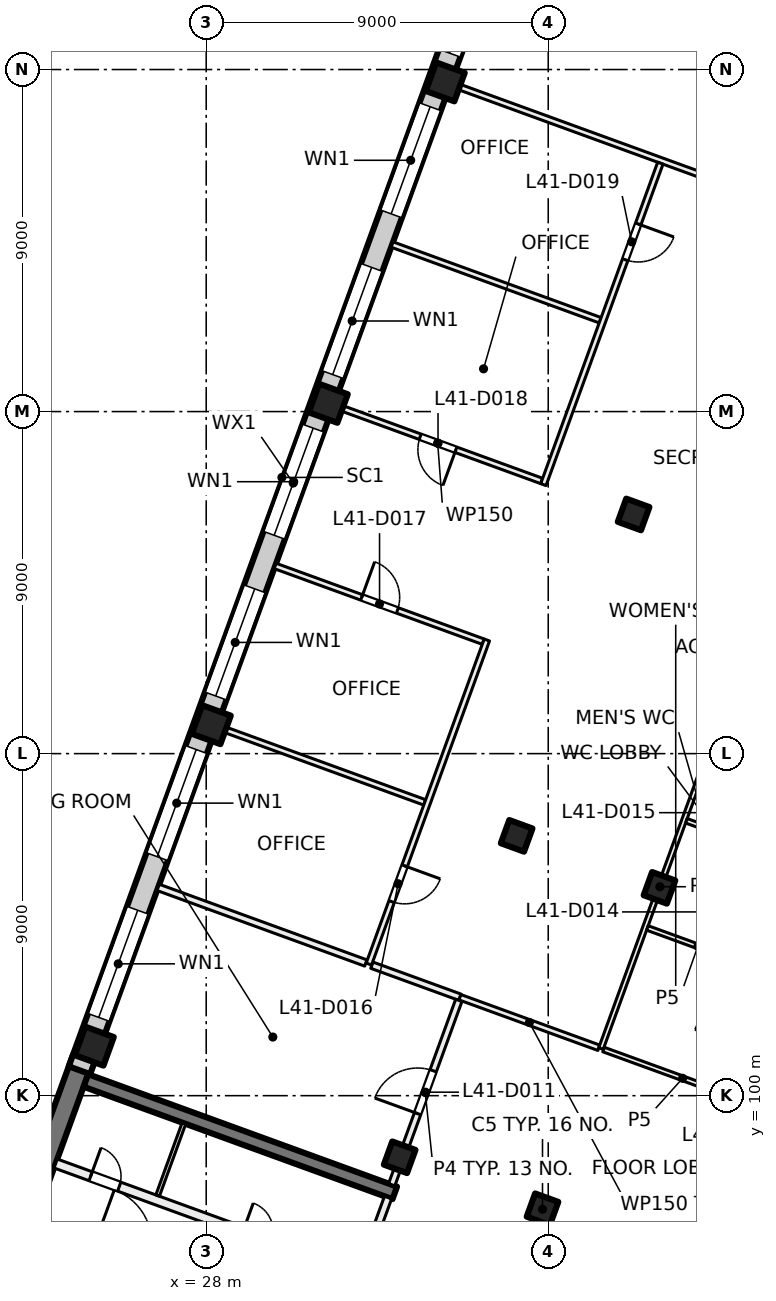
"""IFC4 building model, lengths in metres.
Left out: names, types, materials, properties, quantities, classifications, styles, units other than length and angle.
Written with IfcOpenShell. Run it as: python <this file> out.ifc"""

import sys

from ifc_helpers import new_model, si_unit, direction, frame, frame_2d, origin, origin_2d, place, context, subcontext, project, spatial, rectangle, extrude, element, fill, save


model = new_model("IFC4")
c1 = context("Model", 3, precision=1e-05, world=origin(), true_north=direction((0.0, 1.0)))
c2 = subcontext(c1, "Body", "Model", "MODEL_VIEW")
j1 = project(units=[si_unit("LENGTHUNIT", "METRE"), si_unit("PLANEANGLEUNIT", "RADIAN")], contexts=[c1])
p1 = place(None, origin())
s1 = spatial("IfcSite", under=j1, at=p1, CompositionType="ELEMENT")
p2 = place(p1, origin())
s2 = spatial("IfcBuilding", under=s1, at=p2, CompositionType="ELEMENT")
p3 = place(p2, frame((0.0, 0.0, 174.5)))
s3 = spatial("IfcBuildingStorey", under=s2, at=p3, CompositionType="ELEMENT", Elevation=174.5)
for number, where, z_axis, x_axis in (
    (1, (39.927, 105.468, 0.0), (0.0, 0.0, 1.0), (-0.342, -0.94, 0.0)),
    (2, (36.849, 97.011, 0.0), (0.0, 0.0, 1.0), (-0.342, -0.94, 0.0)),
    (3, (39.247, 115.293, 0.0), (0.0, 0.0, 1.0), (-0.342, -0.94, 0.0)),
    (4, (36.169, 106.836, 0.0), (0.0, 0.0, 1.0), (-0.342, -0.94, 0.0)),
    (5, (33.091, 98.379, 0.0), (0.0, 0.0, 1.0), (-0.342, -0.94, 0.0)),
):
    element("IfcColumn", number, at=place(p3, frame(where, z_axis=z_axis, x_axis=x_axis)), inside=s3, PredefinedType="COLUMN", context=c2, shape_type="SweptSolid", body=[
        extrude(rectangle(XDim=0.65, YDim=0.65, at=origin_2d()), origin(), (0.0, 0.0, 1.0), 4.0),
    ])
for number, where, z_axis, x_axis in (
    (6, (34.291, 126.675, 0.0), (0.0, 0.0, 1.0), (-0.342, -0.94, 0.0)),
    (7, (31.212, 118.218, 0.0), (0.0, 0.0, 1.0), (-0.342, -0.94, 0.0)),
    (8, (28.134, 109.76, 0.0), (0.0, 0.0, 1.0), (-0.342, -0.94, 0.0)),
    (9, (25.056, 101.303, 0.0), (0.0, 0.0, 1.0), (-0.342, -0.94, 0.0)),
):
    element("IfcColumn", number, at=place(p3, frame(where, z_axis=z_axis, x_axis=x_axis)), inside=s3, PredefinedType="COLUMN", context=c2, shape_type="SweptSolid", body=[
        extrude(rectangle(XDim=0.8, YDim=0.8, at=origin_2d()), origin(), (0.0, 0.0, 1.0), 4.0),
    ])
p4 = place(p3, frame((21.694, 92.577, 0.0), z_axis=(0.0, 0.0, 1.0), x_axis=(0.342010253184, 0.939696220444, 0.0)))
e10 = element("IfcWall", 10, at=p4, inside=s3, PredefinedType="SHEAR", context=c2, shape_type="SweptSolid", body=[
    extrude(rectangle(XDim=8.95, YDim=0.55, at=frame_2d((4.475, 0.0))), origin(), (0.0, 0.0, 1.0), 4.0),
])
p5 = place(p3, frame((32.962, 97.441, 0.0), z_axis=(0.0, 0.0, 1.0), x_axis=(-0.939689545667, 0.342028592028, 0.0)))
e11 = element("IfcWall", 11, at=p5, inside=s3, PredefinedType="SHEAR", context=c2, shape_type="SweptSolid", body=[
    extrude(rectangle(XDim=8.65, YDim=0.35, at=frame_2d((4.325, 0.0))), origin(), (0.0, 0.0, 1.0), 4.0),
])
p6 = place(p3, frame((24.666, 100.669, 0.0), z_axis=(0.0, 0.0, 1.0), x_axis=(0.34201964167, 0.939692803373, 0.0)))
e12 = element("IfcWall", 12, at=p6, inside=s3, PredefinedType="SOLIDWALL", context=c2, shape_type="SweptSolid", body=[
    extrude(rectangle(XDim=32.884, YDim=0.6, at=frame_2d((16.442, 0.0))), origin(), (0.0, 0.0, 1.0), 3.625),
])
p7 = place(p6, frame((1.48, 0.0, 0.9)))
e13 = element("IfcOpeningElement", 13, at=p7, cuts=e12, PredefinedType="OPENING", context=c2, shape_type="SweptSolid", body=[
    extrude(rectangle(XDim=3.0, YDim=2.4, at=frame_2d((1.5, 1.2))), frame((0.0, 0.31, 0.0), z_axis=(0.0, -1.0, 0.0), x_axis=(1.0, 0.0, 0.0)), (0.0, 0.0, 1.0), 0.62),
])
p8 = place(p6, frame((5.98, 0.0, 0.9)))
e14 = element("IfcOpeningElement", 14, at=p8, cuts=e12, PredefinedType="OPENING", context=c2, shape_type="SweptSolid", body=[
    extrude(rectangle(XDim=3.0, YDim=2.4, at=frame_2d((1.5, 1.2))), frame((0.0, 0.31, 0.0), z_axis=(0.0, -1.0, 0.0), x_axis=(1.0, 0.0, 0.0)), (0.0, 0.0, 1.0), 0.62),
])
p9 = place(p6, frame((10.48, 0.0, 0.9)))
e15 = element("IfcOpeningElement", 15, at=p9, cuts=e12, PredefinedType="OPENING", context=c2, shape_type="SweptSolid", body=[
    extrude(rectangle(XDim=3.0, YDim=2.4, at=frame_2d((1.5, 1.2))), frame((0.0, 0.31, 0.0), z_axis=(0.0, -1.0, 0.0), x_axis=(1.0, 0.0, 0.0)), (0.0, 0.0, 1.0), 0.62),
])
p10 = place(p6, frame((14.98, 0.0, 0.9)))
e16 = element("IfcOpeningElement", 16, at=p10, cuts=e12, PredefinedType="OPENING", context=c2, shape_type="SweptSolid", body=[
    extrude(rectangle(XDim=3.0, YDim=2.4, at=frame_2d((1.5, 1.2))), frame((0.0, 0.31, 0.0), z_axis=(0.0, -1.0, 0.0), x_axis=(1.0, 0.0, 0.0)), (0.0, 0.0, 1.0), 0.62),
])
p11 = place(p6, frame((19.48, 0.0, 0.9)))
e17 = element("IfcOpeningElement", 17, at=p11, cuts=e12, PredefinedType="OPENING", context=c2, shape_type="SweptSolid", body=[
    extrude(rectangle(XDim=3.0, YDim=2.4, at=frame_2d((1.5, 1.2))), frame((0.0, 0.31, 0.0), z_axis=(0.0, -1.0, 0.0), x_axis=(1.0, 0.0, 0.0)), (0.0, 0.0, 1.0), 0.62),
])
p12 = place(p6, frame((23.98, 0.0, 0.9)))
e18 = element("IfcOpeningElement", 18, at=p12, cuts=e12, PredefinedType="OPENING", context=c2, shape_type="SweptSolid", body=[
    extrude(rectangle(XDim=3.0, YDim=2.4, at=frame_2d((1.5, 1.2))), frame((0.0, 0.31, 0.0), z_axis=(0.0, -1.0, 0.0), x_axis=(1.0, 0.0, 0.0)), (0.0, 0.0, 1.0), 0.62),
])
p13 = place(p6, frame((28.48, 0.0, 0.9)))
e19 = element("IfcOpeningElement", 19, at=p13, cuts=e12, PredefinedType="OPENING", context=c2, shape_type="SweptSolid", body=[
    extrude(rectangle(XDim=3.0, YDim=2.4, at=frame_2d((1.5, 1.2))), frame((0.0, 0.31, 0.0), z_axis=(0.0, -1.0, 0.0), x_axis=(1.0, 0.0, 0.0)), (0.0, 0.0, 1.0), 0.62),
])
p14 = place(p3, frame((31.459, 93.678, 0.0), z_axis=(0.0, 0.0, 1.0), x_axis=(0.341985870128, 0.939705094502, 0.0)))
e20 = element("IfcWall", 20, at=p14, inside=s3, PredefinedType="PARTITIONING", context=c2, shape_type="SweptSolid", body=[
    extrude(rectangle(XDim=3.875, YDim=0.2, at=frame_2d((1.938, 0.0))), origin(), (0.0, 0.0, 1.0), 3.625),
])
p15 = place(p14, frame((0.3, 0.0, 0.0)))
e21 = element("IfcOpeningElement", 21, at=p15, cuts=e20, PredefinedType="OPENING", context=c2, shape_type="SweptSolid", body=[
    extrude(rectangle(XDim=1.2, YDim=2.1, at=frame_2d((0.6, 1.05))), frame((0.0, 0.11, 0.0), z_axis=(0.0, -1.0, 0.0), x_axis=(1.0, 0.0, 0.0)), (0.0, 0.0, 1.0), 0.22),
])
p16 = place(p3, frame((23.483, 96.688, 0.0), z_axis=(0.0, 0.0, 1.0), x_axis=(0.939691007314, -0.342024576271, 0.0)))
e22 = element("IfcWall", 22, at=p16, inside=s3, PredefinedType="PARTITIONING", context=c2, shape_type="SweptSolid", body=[
    extrude(rectangle(XDim=8.425, YDim=0.2, at=frame_2d((4.212, 0.0))), origin(), (0.0, 0.0, 1.0), 3.625),
])
p17 = place(p16, frame((1.688, 0.0, 0.0)))
e23 = element("IfcOpeningElement", 23, at=p17, cuts=e22, PredefinedType="OPENING", context=c2, shape_type="SweptSolid", body=[
    extrude(rectangle(XDim=1.5, YDim=2.1, at=frame_2d((0.75, 1.05))), frame((0.0, 0.11, 0.0), z_axis=(0.0, -1.0, 0.0), x_axis=(1.0, 0.0, 0.0)), (0.0, 0.0, 1.0), 0.22),
])
p18 = place(p3, frame((24.039, 98.215, 0.0), z_axis=(0.0, 0.0, 1.0), x_axis=(0.939687617333, -0.342033889887, 0.0)))
e24 = element("IfcWall", 24, at=p18, inside=s3, PredefinedType="PARTITIONING", context=c2, shape_type="SweptSolid", body=[
    extrude(rectangle(XDim=8.425, YDim=0.25, at=frame_2d((4.212, 0.0))), origin(), (0.0, 0.0, 1.0), 3.625),
])
p19 = place(p18, frame((5.242, 0.0, 0.0)))
e25 = element("IfcOpeningElement", 25, at=p19, cuts=e24, PredefinedType="OPENING", context=c2, shape_type="SweptSolid", body=[
    extrude(rectangle(XDim=0.8, YDim=2.1, at=frame_2d((0.4, 1.05))), frame((0.0, 0.135, 0.0), z_axis=(0.0, -1.0, 0.0), x_axis=(1.0, 0.0, 0.0)), (0.0, 0.0, 1.0), 0.27),
])
p20 = place(p18, frame((0.98, 0.0, 0.0)))
e26 = element("IfcOpeningElement", 26, at=p20, cuts=e24, PredefinedType="OPENING", context=c2, shape_type="SweptSolid", body=[
    extrude(rectangle(XDim=0.8, YDim=2.1, at=frame_2d((0.4, 1.05))), frame((0.0, 0.135, 0.0), z_axis=(0.0, -1.0, 0.0), x_axis=(1.0, 0.0, 0.0)), (0.0, 0.0, 1.0), 0.27),
])
p21 = place(p3, frame((26.722, 97.371, 0.0), z_axis=(0.0, 0.0, 1.0), x_axis=(0.342004391282, 0.939698353911, 0.0)))
e27 = element("IfcWall", 27, at=p21, inside=s3, PredefinedType="PARTITIONING", context=c2, shape_type="SweptSolid", body=[
    extrude(rectangle(XDim=2.025, YDim=0.1, at=frame_2d((1.013, 0.0))), origin(), (0.0, 0.0, 1.0), 3.625),
])
p22 = place(p3, frame((26.736, 105.48, 0.0), z_axis=(0.0, 0.0, 1.0), x_axis=(0.939674453825, -0.342070052516, 0.0)))
e28 = element("IfcWall", 28, at=p22, inside=s3, PredefinedType="PARTITIONING", context=c2, shape_type="SweptSolid", body=[
    extrude(rectangle(XDim=5.815, YDim=0.175, at=frame_2d((2.907, 0.0))), origin(), (0.0, 0.0, 1.0), 3.625),
])
p23 = place(p3, frame((28.275, 109.709, 0.0), z_axis=(0.0, 0.0, 1.0), x_axis=(0.939718757431, -0.341948324943, 0.0)))
e29 = element("IfcWall", 29, at=p23, inside=s3, PredefinedType="PARTITIONING", context=c2, shape_type="SweptSolid", body=[
    extrude(rectangle(XDim=5.825, YDim=0.15, at=frame_2d((2.913, 0.0))), origin(), (0.0, 0.0, 1.0), 3.625),
])
p24 = place(p3, frame((29.814, 113.938, 0.0), z_axis=(0.0, 0.0, 1.0), x_axis=(0.939738354986, -0.341894463495, 0.0)))
e30 = element("IfcWall", 30, at=p24, inside=s3, PredefinedType="PARTITIONING", context=c2, shape_type="SweptSolid", body=[
    extrude(rectangle(XDim=5.826, YDim=0.15, at=frame_2d((2.913, 0.0))), origin(), (0.0, 0.0, 1.0), 3.625),
])
p25 = place(p24, frame((2.423, 0.0, 0.0)))
e31 = element("IfcOpeningElement", 31, at=p25, cuts=e30, PredefinedType="OPENING", context=c2, shape_type="SweptSolid", body=[
    extrude(rectangle(XDim=1.0, YDim=2.1, at=frame_2d((0.5, 1.05))), frame((0.0, 0.085, 0.0), z_axis=(0.0, -1.0, 0.0), x_axis=(1.0, 0.0, 0.0)), (0.0, 0.0, 1.0), 0.17),
])
p26 = place(p3, frame((32.359, 103.433, 0.0), z_axis=(0.0, 0.0, 1.0), x_axis=(0.939784753685, -0.341766904105, 0.0)))
e32 = element("IfcWall", 32, at=p26, inside=s3, PredefinedType="PARTITIONING", context=c2, shape_type="SweptSolid", body=[
    extrude(rectangle(XDim=2.467, YDim=0.175, at=frame_2d((1.233, 0.0))), origin(), (0.0, 0.0, 1.0), 3.625),
])
p27 = place(p3, frame((32.892, 122.395, 0.0), z_axis=(0.0, 0.0, 1.0), x_axis=(0.939733456466, -0.341907927371, 0.0)))
e33 = element("IfcWall", 33, at=p27, inside=s3, PredefinedType="PARTITIONING", context=c2, shape_type="SweptSolid", body=[
    extrude(rectangle(XDim=5.826, YDim=0.15, at=frame_2d((2.913, 0.0))), origin(), (0.0, 0.0, 1.0), 3.625),
])
p28 = place(p3, frame((34.431, 126.624, 0.0), z_axis=(0.0, 0.0, 1.0), x_axis=(0.939678226331, -0.342059689177, 0.0)))
e34 = element("IfcWall", 34, at=p28, inside=s3, PredefinedType="PARTITIONING", context=c2, shape_type="SweptSolid", body=[
    extrude(rectangle(XDim=16.901, YDim=0.15, at=frame_2d((8.45, 0.0))), origin(), (0.0, 0.0, 1.0), 3.625),
])
p29 = place(p3, frame((32.881, 97.657, 0.0), z_axis=(0.0, 0.0, 1.0), x_axis=(0.342058204353, 0.939678766832, 0.0)))
e35 = element("IfcWall", 35, at=p29, inside=s3, PredefinedType="PARTITIONING", context=c2, shape_type="SweptSolid", body=[
    extrude(rectangle(XDim=5.163, YDim=0.175, at=frame_2d((2.581, 0.0))), origin(), (0.0, 0.0, 1.0), 3.625),
])
p30 = place(p29, frame((1.991, 0.0, 0.0)))
e36 = element("IfcOpeningElement", 36, at=p30, cuts=e35, PredefinedType="OPENING", context=c2, shape_type="SweptSolid", body=[
    extrude(rectangle(XDim=1.2, YDim=2.1, at=frame_2d((0.6, 1.05))), frame((0.0, 0.097, 0.0), z_axis=(0.0, -1.0, 0.0), x_axis=(1.0, 0.0, 0.0)), (0.0, 0.0, 1.0), 0.195),
])
p31 = place(p3, frame((34.677, 102.59, 0.0), z_axis=(0.0, 0.0, 1.0), x_axis=(0.939712759945, -0.341964806371, 0.0)))
e37 = element("IfcWall", 37, at=p31, inside=s3, PredefinedType="PARTITIONING", context=c2, shape_type="SweptSolid", body=[
    extrude(rectangle(XDim=3.889, YDim=0.15, at=frame_2d((1.945, 0.0))), origin(), (0.0, 0.0, 1.0), 3.625),
])
p32 = place(p3, frame((35.385, 111.99, 0.0), z_axis=(0.0, 0.0, 1.0), x_axis=(-0.342153449842, -0.939644090473, 0.0)))
e38 = element("IfcWall", 38, at=p32, inside=s3, PredefinedType="PARTITIONING", context=c2, shape_type="SweptSolid", body=[
    extrude(rectangle(XDim=9.075, YDim=0.15, at=frame_2d((4.537, 0.0))), origin(), (0.0, 0.0, 1.0), 3.625),
])
p33 = place(p32, frame((6.325, 0.0, 0.0)))
e39 = element("IfcOpeningElement", 39, at=p33, cuts=e38, PredefinedType="OPENING", context=c2, shape_type="SweptSolid", body=[
    extrude(rectangle(XDim=1.0, YDim=2.1, at=frame_2d((0.5, 1.05))), frame((0.0, 0.085, 0.0), z_axis=(0.0, -1.0, 0.0), x_axis=(1.0, 0.0, 0.0)), (0.0, 0.0, 1.0), 0.17),
])
p34 = place(p3, frame((36.828, 116.174, 0.0), z_axis=(0.0, 0.0, 1.0), x_axis=(-0.939733456466, 0.341907927371, 0.0)))
e40 = element("IfcWall", 40, at=p34, inside=s3, PredefinedType="PARTITIONING", context=c2, shape_type="SweptSolid", body=[
    extrude(rectangle(XDim=5.826, YDim=0.15, at=frame_2d((2.913, 0.0))), origin(), (0.0, 0.0, 1.0), 3.625),
])
p35 = place(p34, frame((2.403, 0.0, 0.0)))
e41 = element("IfcOpeningElement", 41, at=p35, cuts=e40, PredefinedType="OPENING", context=c2, shape_type="SweptSolid", body=[
    extrude(rectangle(XDim=1.0, YDim=2.1, at=frame_2d((0.5, 1.05))), frame((0.0, 0.085, 0.0), z_axis=(0.0, -1.0, 0.0), x_axis=(1.0, 0.0, 0.0)), (0.0, 0.0, 1.0), 0.17),
])
p36 = place(p3, frame((39.95, 124.536, 0.0), z_axis=(0.0, 0.0, 1.0), x_axis=(-0.341963022424, -0.939713409128, 0.0)))
e42 = element("IfcWall", 42, at=p36, inside=s3, PredefinedType="PARTITIONING", context=c2, shape_type="SweptSolid", body=[
    extrude(rectangle(XDim=9.001, YDim=0.15, at=frame_2d((4.5, 0.0))), origin(), (0.0, 0.0, 1.0), 3.625),
])
p37 = place(p36, frame((1.703, 0.0, 0.0)))
e43 = element("IfcOpeningElement", 43, at=p37, cuts=e42, PredefinedType="OPENING", context=c2, shape_type="SweptSolid", body=[
    extrude(rectangle(XDim=1.0, YDim=2.1, at=frame_2d((0.5, 1.05))), frame((0.0, 0.085, 0.0), z_axis=(0.0, -1.0, 0.0), x_axis=(1.0, 0.0, 0.0)), (0.0, 0.0, 1.0), 0.17),
])
p38 = place(p3, frame((38.455, 101.214, 0.0), z_axis=(0.0, 0.0, 1.0), x_axis=(0.939738687483, -0.341893549585, 0.0)))
e44 = element("IfcWall", 44, at=p38, inside=s3, PredefinedType="PARTITIONING", context=c2, shape_type="SweptSolid", body=[
    extrude(rectangle(XDim=4.429, YDim=0.125, at=frame_2d((2.214, 0.0))), origin(), (0.0, 0.0, 1.0), 3.625),
])
p39 = place(p3, frame((38.388, 101.24, 0.0), z_axis=(0.0, 0.0, 1.0), x_axis=(0.342067486799, 0.93967538782, 0.0)))
e45 = element("IfcWall", 45, at=p39, inside=s3, PredefinedType="PARTITIONING", context=c2, shape_type="SweptSolid", body=[
    extrude(rectangle(XDim=9.063, YDim=0.125, at=frame_2d((4.531, 0.0))), origin(), (0.0, 0.0, 1.0), 3.625),
])
p40 = place(p3, frame((42.264, 103.446, 0.0), z_axis=(0.0, 0.0, 1.0), x_axis=(-0.939563555473, 0.342374539396, 0.0)))
e46 = element("IfcWall", 46, at=p40, inside=s3, PredefinedType="PARTITIONING", context=c2, shape_type="SweptSolid", body=[
    extrude(rectangle(XDim=2.824, YDim=0.125, at=frame_2d((1.412, 0.0))), origin(), (0.0, 0.0, 1.0), 3.625),
])
p41 = place(p3, frame((43.29, 106.266, 0.0), z_axis=(0.0, 0.0, 1.0), x_axis=(-0.939601484935, 0.342270433294, 0.0)))
e47 = element("IfcWall", 47, at=p41, inside=s3, PredefinedType="PARTITIONING", context=c2, shape_type="SweptSolid", body=[
    extrude(rectangle(XDim=2.825, YDim=0.125, at=frame_2d((1.412, 0.0))), origin(), (0.0, 0.0, 1.0), 3.625),
])
p42 = place(p7, origin())
e48 = element("IfcWindow", 48, at=p42, inside=s3, PartitioningType="SINGLE_PANEL", PredefinedType="WINDOW", context=c2, shape_type="SweptSolid", body=[
    extrude(rectangle(XDim=3.0, YDim=2.4, at=frame_2d((1.5, 1.2))), frame((0.0, 0.03, 0.0), z_axis=(0.0, -1.0, 0.0), x_axis=(1.0, 0.0, 0.0)), (0.0, 0.0, 1.0), 0.06),
])
fill(e13, e48)
p43 = place(p8, origin())
e49 = element("IfcWindow", 49, at=p43, inside=s3, PartitioningType="SINGLE_PANEL", PredefinedType="WINDOW", context=c2, shape_type="SweptSolid", body=[
    extrude(rectangle(XDim=3.0, YDim=2.4, at=frame_2d((1.5, 1.2))), frame((0.0, 0.03, 0.0), z_axis=(0.0, -1.0, 0.0), x_axis=(1.0, 0.0, 0.0)), (0.0, 0.0, 1.0), 0.06),
])
fill(e14, e49)
p44 = place(p9, origin())
e50 = element("IfcWindow", 50, at=p44, inside=s3, PartitioningType="SINGLE_PANEL", PredefinedType="WINDOW", context=c2, shape_type="SweptSolid", body=[
    extrude(rectangle(XDim=3.0, YDim=2.4, at=frame_2d((1.5, 1.2))), frame((0.0, 0.03, 0.0), z_axis=(0.0, -1.0, 0.0), x_axis=(1.0, 0.0, 0.0)), (0.0, 0.0, 1.0), 0.06),
])
fill(e15, e50)
p45 = place(p10, origin())
e51 = element("IfcWindow", 51, at=p45, inside=s3, PartitioningType="SINGLE_PANEL", PredefinedType="WINDOW", context=c2, shape_type="SweptSolid", body=[
    extrude(rectangle(XDim=3.0, YDim=2.4, at=frame_2d((1.5, 1.2))), frame((0.0, 0.03, 0.0), z_axis=(0.0, -1.0, 0.0), x_axis=(1.0, 0.0, 0.0)), (0.0, 0.0, 1.0), 0.06),
])
fill(e16, e51)
p46 = place(p11, origin())
e52 = element("IfcWindow", 52, at=p46, inside=s3, PartitioningType="SINGLE_PANEL", PredefinedType="WINDOW", context=c2, shape_type="SweptSolid", body=[
    extrude(rectangle(XDim=3.0, YDim=2.4, at=frame_2d((1.5, 1.2))), frame((0.0, 0.03, 0.0), z_axis=(0.0, -1.0, 0.0), x_axis=(1.0, 0.0, 0.0)), (0.0, 0.0, 1.0), 0.06),
])
fill(e17, e52)
p47 = place(p12, origin())
e53 = element("IfcWindow", 53, at=p47, inside=s3, PartitioningType="SINGLE_PANEL", PredefinedType="WINDOW", context=c2, shape_type="SweptSolid", body=[
    extrude(rectangle(XDim=3.0, YDim=2.4, at=frame_2d((1.5, 1.2))), frame((0.0, 0.03, 0.0), z_axis=(0.0, -1.0, 0.0), x_axis=(1.0, 0.0, 0.0)), (0.0, 0.0, 1.0), 0.06),
])
fill(e18, e53)
p48 = place(p13, origin())
e54 = element("IfcWindow", 54, at=p48, inside=s3, PartitioningType="SINGLE_PANEL", PredefinedType="WINDOW", context=c2, shape_type="SweptSolid", body=[
    extrude(rectangle(XDim=3.0, YDim=2.4, at=frame_2d((1.5, 1.2))), frame((0.0, 0.03, 0.0), z_axis=(0.0, -1.0, 0.0), x_axis=(1.0, 0.0, 0.0)), (0.0, 0.0, 1.0), 0.06),
])
fill(e19, e54)
p49 = place(p20, origin())
e55 = element("IfcDoor", 55, at=p49, inside=s3, OperationType="SINGLE_SWING_RIGHT", PredefinedType="DOOR", context=c2, shape_type="SweptSolid", body=[
    extrude(rectangle(XDim=0.8, YDim=2.1, at=frame_2d((0.4, 1.05))), frame((0.0, 0.025, 0.0), z_axis=(0.0, -1.0, 0.0), x_axis=(1.0, 0.0, 0.0)), (0.0, 0.0, 1.0), 0.05),
])
fill(e26, e55)
p50 = place(p30, origin())
e56 = element("IfcDoor", 56, at=p50, inside=s3, OperationType="DOUBLE_DOOR_SINGLE_SWING", PredefinedType="DOOR", context=c2, shape_type="SweptSolid", body=[
    extrude(rectangle(XDim=1.2, YDim=2.1, at=frame_2d((0.6, 1.05))), frame((0.0, 0.025, 0.0), z_axis=(0.0, -1.0, 0.0), x_axis=(1.0, 0.0, 0.0)), (0.0, 0.0, 1.0), 0.05),
])
fill(e36, e56)
p51 = place(p33, origin())
e57 = element("IfcDoor", 57, at=p51, inside=s3, OperationType="SINGLE_SWING_LEFT", PredefinedType="DOOR", context=c2, shape_type="SweptSolid", body=[
    extrude(rectangle(XDim=1.0, YDim=2.1, at=frame_2d((0.5, 1.05))), frame((0.0, 0.025, 0.0), z_axis=(0.0, -1.0, 0.0), x_axis=(1.0, 0.0, 0.0)), (0.0, 0.0, 1.0), 0.05),
])
fill(e39, e57)
p52 = place(p25, origin())
e58 = element("IfcDoor", 58, at=p52, inside=s3, OperationType="SINGLE_SWING_LEFT", PredefinedType="DOOR", context=c2, shape_type="SweptSolid", body=[
    extrude(rectangle(XDim=1.0, YDim=2.1, at=frame_2d((0.5, 1.05))), frame((0.0, 0.025, 0.0), z_axis=(0.0, -1.0, 0.0), x_axis=(1.0, 0.0, 0.0)), (0.0, 0.0, 1.0), 0.05),
])
fill(e31, e58)
p53 = place(p35, origin())
e59 = element("IfcDoor", 59, at=p53, inside=s3, OperationType="SINGLE_SWING_RIGHT", PredefinedType="DOOR", context=c2, shape_type="SweptSolid", body=[
    extrude(rectangle(XDim=1.0, YDim=2.1, at=frame_2d((0.5, 1.05))), frame((0.0, 0.025, 0.0), z_axis=(0.0, -1.0, 0.0), x_axis=(1.0, 0.0, 0.0)), (0.0, 0.0, 1.0), 0.05),
])
fill(e41, e59)
p54 = place(p37, origin())
e60 = element("IfcDoor", 60, at=p54, inside=s3, OperationType="SINGLE_SWING_LEFT", PredefinedType="DOOR", context=c2, shape_type="SweptSolid", body=[
    extrude(rectangle(XDim=1.0, YDim=2.1, at=frame_2d((0.5, 1.05))), frame((0.0, 0.025, 0.0), z_axis=(0.0, -1.0, 0.0), x_axis=(1.0, 0.0, 0.0)), (0.0, 0.0, 1.0), 0.05),
])
fill(e43, e60)
save(model, sys.argv[1])
